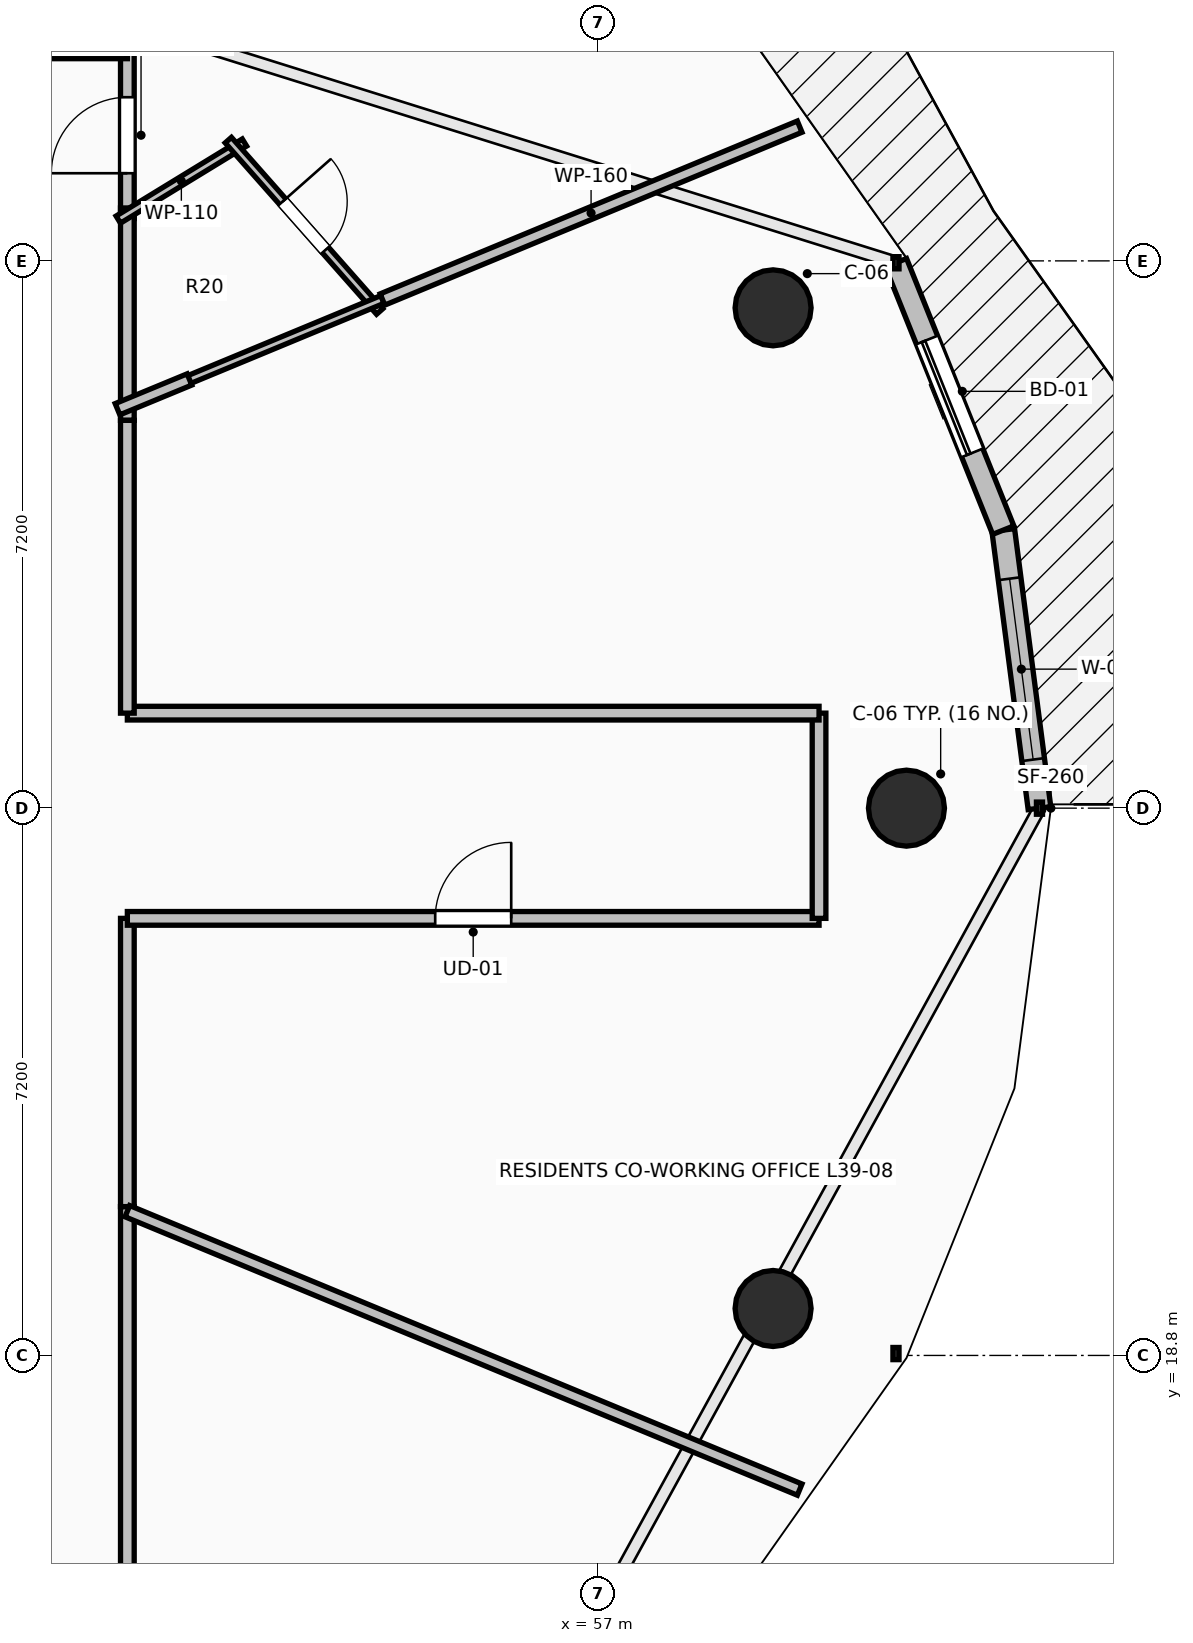
"""IFC4 building model, lengths in metres.
Left out: names, types, materials, properties, quantities, classifications, styles, units other than length and angle.
Written with IfcOpenShell. Run it as: python <this file> out.ifc"""

import sys

from ifc_helpers import new_model, si_unit, direction, frame, frame_2d, origin, origin_2d, place, context, subcontext, project, spatial, rectangle, circle, extrude, element, fill, save


model = new_model("IFC4")
c1 = context("Model", 3, precision=1e-05, world=origin(), true_north=direction((0.0, 1.0)))
c2 = subcontext(c1, "Body", "Model", "MODEL_VIEW")
j1 = project(units=[si_unit("LENGTHUNIT", "METRE"), si_unit("PLANEANGLEUNIT", "RADIAN")], contexts=[c1])
p1 = place(None, origin())
s1 = spatial("IfcSite", under=j1, at=p1, CompositionType="ELEMENT")
p2 = place(p1, origin())
s2 = spatial("IfcBuilding", under=s1, at=p2, CompositionType="ELEMENT")
p3 = place(p2, frame((0.0, 0.0, 146.6)))
s3 = spatial("IfcBuildingStorey", under=s2, at=p3, CompositionType="ELEMENT", Elevation=146.6)
for number, where, z_axis, x_axis in (
    (1, (61.05, 26.0, 0.0), (0.0, 0.0, 1.0), (1.0, 0.0, 0.0)),
    (2, (59.295, 32.582, 0.0), (0.0, 0.0, 1.0), (0.924, 0.383, 0.0)),
    (3, (59.295, 19.418, 0.0), (0.0, 0.0, 1.0), (0.924, -0.383, 0.0)),
):
    element("IfcColumn", number, at=place(p3, frame(where, z_axis=z_axis, x_axis=x_axis)), inside=s3, PredefinedType="COLUMN", context=c2, shape_type="SweptSolid", body=[
        extrude(circle(Radius=0.5, at=origin_2d()), origin(), (0.0, 0.0, 1.0), 3.5),
    ])
p4 = place(p3, frame((62.8, 26.0, 0.0), z_axis=(0.0, 0.0, 1.0), x_axis=(-0.129189225186, 0.991619959509, 0.0)))
e4 = element("IfcWall", 4, at=p4, inside=s3, PredefinedType="STANDARD", context=c2, shape_type="SweptSolid", body=[
    extrude(rectangle(XDim=3.689, YDim=0.3, at=frame_2d((1.844, 0.0))), origin(), (0.0, 0.0, 1.0), 3.24),
])
p5 = place(p4, frame((0.644, 0.0, 0.85)))
e5 = element("IfcOpeningElement", 5, at=p5, cuts=e4, PredefinedType="OPENING", context=c2, shape_type="SweptSolid", body=[
    extrude(rectangle(XDim=2.4, YDim=2.19, at=frame_2d((1.2, 1.095))), frame((0.0, 0.165, 0.0), z_axis=(0.0, -1.0, 0.0), x_axis=(1.0, 0.0, 0.0)), (0.0, 0.0, 1.0), 0.33),
])
p6 = place(p3, frame((62.323, 29.658, 0.0), z_axis=(0.0, 0.0, 1.0), x_axis=(-0.372401154411, 0.928071861546, 0.0)))
e6 = element("IfcWall", 6, at=p6, inside=s3, PredefinedType="STANDARD", context=c2, shape_type="SweptSolid", body=[
    extrude(rectangle(XDim=3.79, YDim=0.3, at=frame_2d((1.895, 0.0))), origin(), (0.0, 0.0, 1.0), 3.24),
])
p7 = place(p6, frame((1.095, 0.0, 0.0)))
e7 = element("IfcOpeningElement", 7, at=p7, cuts=e6, PredefinedType="OPENING", context=c2, shape_type="SweptSolid", body=[
    extrude(rectangle(XDim=1.6, YDim=2.3, at=frame_2d((0.8, 1.15))), frame((0.0, 0.165, 0.0), z_axis=(0.0, -1.0, 0.0), x_axis=(1.0, 0.0, 0.0)), (0.0, 0.0, 1.0), 0.33),
])
p8 = place(p3, frame((50.8, 33.756, 0.0), z_axis=(0.0, 0.0, 1.0), x_axis=(0.0, 1.0, 0.0)))
e8 = element("IfcWall", 8, at=p8, inside=s3, PredefinedType="PARTITIONING", context=c2, shape_type="SweptSolid", body=[
    extrude(rectangle(XDim=2.194, YDim=0.18, at=frame_2d((1.097, 0.0))), origin(), (0.0, 0.0, 1.0), 2.432),
])
p9 = place(p8, frame((0.597, 0.0, 0.0)))
e9 = element("IfcOpeningElement", 9, at=p9, cuts=e8, PredefinedType="OPENING", context=c2, shape_type="SweptSolid", body=[
    extrude(rectangle(XDim=1.0, YDim=2.15, at=frame_2d((0.5, 1.075))), frame((0.0, 0.105, 0.0), z_axis=(0.0, -1.0, 0.0), x_axis=(1.0, 0.0, 0.0)), (0.0, 0.0, 1.0), 0.21),
])
p10 = place(p3, frame((50.8, 35.95, 0.0), z_axis=(0.0, 0.0, 1.0), x_axis=(-1.0, 0.0, 0.0)))
e10 = element("IfcWall", 10, at=p10, inside=s3, PredefinedType="PARTITIONING", context=c2, shape_type="SweptSolid", body=[
    extrude(rectangle(XDim=2.096, YDim=0.18, at=frame_2d((1.048, 0.0))), origin(), (0.0, 0.0, 1.0), 2.972),
])
p11 = place(p3, frame((50.8, 31.102, 0.0), z_axis=(0.0, 0.0, 1.0), x_axis=(0.0, 1.0, 0.0)))
e11 = element("IfcWall", 11, at=p11, inside=s3, PredefinedType="PARTITIONING", context=c2, shape_type="SweptSolid", body=[
    extrude(rectangle(XDim=2.794, YDim=0.18, at=frame_2d((1.397, 0.0))), origin(), (0.0, 0.0, 1.0), 2.432),
])
p12 = place(p3, frame((50.8, 14.05, 0.0), z_axis=(0.0, 0.0, 1.0), x_axis=(0.0, 1.0, 0.0)))
e12 = element("IfcWall", 12, at=p12, inside=s3, PredefinedType="PARTITIONING", context=c2, shape_type="SweptSolid", body=[
    extrude(rectangle(XDim=6.708, YDim=0.18, at=frame_2d((3.354, 0.0))), origin(), (0.0, 0.0, 1.0), 2.432),
])
p13 = place(p3, frame((50.8, 20.758, 0.0), z_axis=(0.0, 0.0, 1.0), x_axis=(0.0, 1.0, 0.0)))
e13 = element("IfcWall", 13, at=p13, inside=s3, PredefinedType="PARTITIONING", context=c2, shape_type="SweptSolid", body=[
    extrude(rectangle(XDim=3.792, YDim=0.18, at=frame_2d((1.896, 0.0))), origin(), (0.0, 0.0, 1.0), 3.24),
])
p14 = place(p3, frame((50.8, 24.55, 0.0), z_axis=(0.0, 0.0, 1.0), x_axis=(1.0, 0.0, 0.0)))
e14 = element("IfcWall", 14, at=p14, inside=s3, PredefinedType="PARTITIONING", context=c2, shape_type="SweptSolid", body=[
    extrude(rectangle(XDim=9.1, YDim=0.18, at=frame_2d((4.55, 0.0))), origin(), (0.0, 0.0, 1.0), 2.432),
])
p15 = place(p14, frame((4.05, 0.0, 0.0)))
e15 = element("IfcOpeningElement", 15, at=p15, cuts=e14, PredefinedType="OPENING", context=c2, shape_type="SweptSolid", body=[
    extrude(rectangle(XDim=1.0, YDim=2.15, at=frame_2d((0.5, 1.075))), frame((0.0, 0.105, 0.0), z_axis=(0.0, -1.0, 0.0), x_axis=(1.0, 0.0, 0.0)), (0.0, 0.0, 1.0), 0.21),
])
p16 = place(p3, frame((59.9, 24.55, 0.0), z_axis=(0.0, 0.0, 1.0), x_axis=(0.0, 1.0, 0.0)))
e16 = element("IfcWall", 16, at=p16, inside=s3, PredefinedType="PARTITIONING", context=c2, shape_type="SweptSolid", body=[
    extrude(rectangle(XDim=2.7, YDim=0.18, at=frame_2d((1.35, 0.0))), origin(), (0.0, 0.0, 1.0), 2.432),
])
p17 = place(p3, frame((59.9, 27.25, 0.0), z_axis=(0.0, 0.0, 1.0), x_axis=(-1.0, 0.0, 0.0)))
e17 = element("IfcWall", 17, at=p17, inside=s3, PredefinedType="PARTITIONING", context=c2, shape_type="SweptSolid", body=[
    extrude(rectangle(XDim=9.1, YDim=0.18, at=frame_2d((4.55, 0.0))), origin(), (0.0, 0.0, 1.0), 2.432),
])
p18 = place(p3, frame((50.8, 27.25, 0.0), z_axis=(0.0, 0.0, 1.0), x_axis=(0.0, 1.0, 0.0)))
e18 = element("IfcWall", 18, at=p18, inside=s3, PredefinedType="PARTITIONING", context=c2, shape_type="SweptSolid", body=[
    extrude(rectangle(XDim=3.852, YDim=0.18, at=frame_2d((1.926, 0.0))), origin(), (0.0, 0.0, 1.0), 2.432),
])
p19 = place(p3, frame((50.68, 33.743, 0.0), z_axis=(0.0, 0.0, 1.0), x_axis=(0.853368681548, 0.52130786811, 0.0)))
e19 = element("IfcWall", 19, at=p19, inside=s3, PredefinedType="PARTITIONING", context=c2, shape_type="SweptSolid", body=[
    extrude(rectangle(XDim=1.945, YDim=0.11, at=frame_2d((0.973, 0.0))), origin(), (0.0, 0.0, 1.0), 2.972),
])
p20 = place(p3, frame((52.128, 34.789, 0.0), z_axis=(0.0, 0.0, 1.0), x_axis=(0.66196248337, -0.74953697081, 0.0)))
e20 = element("IfcWall", 20, at=p20, inside=s3, PredefinedType="PARTITIONING", context=c2, shape_type="SweptSolid", body=[
    extrude(rectangle(XDim=3.008, YDim=0.11, at=frame_2d((1.504, 0.0))), origin(), (0.0, 0.0, 1.0), 2.432),
])
p21 = place(p20, frame((1.079, 0.0, 0.0)))
e21 = element("IfcOpeningElement", 21, at=p21, cuts=e20, PredefinedType="OPENING", context=c2, shape_type="SweptSolid", body=[
    extrude(rectangle(XDim=0.85, YDim=2.1, at=frame_2d((0.425, 1.05))), frame((0.0, 0.07, 0.0), z_axis=(0.0, -1.0, 0.0), x_axis=(1.0, 0.0, 0.0)), (0.0, 0.0, 1.0), 0.14),
])
p22 = place(p3, frame((54.156, 32.693, 0.0), z_axis=(0.0, 0.0, 1.0), x_axis=(-0.923770555063, -0.382946421316, 0.0)))
e22 = element("IfcWall", 22, at=p22, inside=s3, PredefinedType="PARTITIONING", context=c2, shape_type="SweptSolid", body=[
    extrude(rectangle(XDim=2.889, YDim=0.11, at=frame_2d((1.444, 0.0))), origin(), (0.0, 0.0, 1.0), 2.432),
])
p23 = place(p3, frame((51.874, 38.824, 0.0), z_axis=(0.0, 0.0, 1.0), x_axis=(-0.734347971597, -0.678773199685, 0.0)))
e23 = element("IfcWall", 23, at=p23, inside=s3, PredefinedType="PARTITIONING", context=c2, shape_type="SweptSolid", body=[
    extrude(rectangle(XDim=4.235, YDim=0.125, at=frame_2d((2.117, 0.0))), origin(), (0.0, 0.0, 1.0), 2.922),
])
p24 = place(p23, frame((1.667, 0.0, 0.0)))
e24 = element("IfcOpeningElement", 24, at=p24, cuts=e23, PredefinedType="OPENING", context=c2, shape_type="SweptSolid", body=[
    extrude(rectangle(XDim=0.9, YDim=2.1, at=frame_2d((0.45, 1.05))), frame((0.0, 0.077, 0.0), z_axis=(0.0, -1.0, 0.0), x_axis=(1.0, 0.0, 0.0)), (0.0, 0.0, 1.0), 0.155),
])
p25 = place(p3, frame((54.156, 32.692, 0.0), z_axis=(0.0, 0.0, 1.0), x_axis=(0.923849528339, 0.382755860814, 0.0)))
e25 = element("IfcWall", 25, at=p25, inside=s3, PredefinedType="PARTITIONING", context=c2, shape_type="SweptSolid", body=[
    extrude(rectangle(XDim=5.941, YDim=0.16, at=frame_2d((2.97, 0.0))), origin(), (0.0, 0.0, 1.0), 2.432),
])
p26 = place(p3, frame((50.671, 31.249, 0.0), z_axis=(0.0, 0.0, 1.0), x_axis=(0.924089428906, 0.38217630406, 0.0)))
e26 = element("IfcWall", 26, at=p26, inside=s3, PredefinedType="PARTITIONING", context=c2, shape_type="SweptSolid", body=[
    extrude(rectangle(XDim=1.024, YDim=0.16, at=frame_2d((0.512, 0.0))), origin(), (0.0, 0.0, 1.0), 3.24),
])
p27 = place(p3, frame((50.908, 41.94, 0.0), z_axis=(0.0, 0.0, 1.0), x_axis=(-0.62935766896, -0.77711577292, 0.0)))
e27 = element("IfcWall", 27, at=p27, inside=s3, PredefinedType="PARTITIONING", context=c2, shape_type="SweptSolid", body=[
    extrude(rectangle(XDim=7.708, YDim=0.125, at=frame_2d((3.854, 0.0))), origin(), (0.0, 0.0, 1.0), 2.432),
])
p28 = place(p3, frame((59.645, 17.035, 0.0), z_axis=(0.0, 0.0, 1.0), x_axis=(-0.923902460479, 0.382628074665, 0.0)))
e28 = element("IfcWall", 28, at=p28, inside=s3, PredefinedType="PARTITIONING", context=c2, shape_type="SweptSolid", body=[
    extrude(rectangle(XDim=9.573, YDim=0.16, at=frame_2d((4.787, 0.0))), origin(), (0.0, 0.0, 1.0), 2.728),
])
p29 = place(p7, origin())
e29 = element("IfcDoor", 29, at=p29, inside=s3, OperationType="SLIDING_TO_LEFT", PredefinedType="DOOR", context=c2, shape_type="SweptSolid", body=[
    extrude(rectangle(XDim=1.6, YDim=2.3, at=frame_2d((0.8, 1.15))), frame((0.0, 0.025, 0.0), z_axis=(0.0, -1.0, 0.0), x_axis=(1.0, 0.0, 0.0)), (0.0, 0.0, 1.0), 0.05),
])
fill(e7, e29)
p30 = place(p5, origin())
e30 = element("IfcWindow", 30, at=p30, inside=s3, PartitioningType="SINGLE_PANEL", PredefinedType="WINDOW", context=c2, shape_type="SweptSolid", body=[
    extrude(rectangle(XDim=2.4, YDim=2.19, at=frame_2d((1.2, 1.095))), frame((0.0, 0.03, 0.0), z_axis=(0.0, -1.0, 0.0), x_axis=(1.0, 0.0, 0.0)), (0.0, 0.0, 1.0), 0.06),
])
fill(e5, e30)
p31 = place(p9, origin())
e31 = element("IfcDoor", 31, at=p31, inside=s3, OperationType="SINGLE_SWING_LEFT", PredefinedType="DOOR", context=c2, shape_type="SweptSolid", body=[
    extrude(rectangle(XDim=1.0, YDim=2.15, at=frame_2d((0.5, 1.075))), frame((0.0, 0.025, 0.0), z_axis=(0.0, -1.0, 0.0), x_axis=(1.0, 0.0, 0.0)), (0.0, 0.0, 1.0), 0.05),
])
fill(e9, e31)
p32 = place(p15, origin())
e32 = element("IfcDoor", 32, at=p32, inside=s3, OperationType="SINGLE_SWING_RIGHT", PredefinedType="DOOR", context=c2, shape_type="SweptSolid", body=[
    extrude(rectangle(XDim=1.0, YDim=2.15, at=frame_2d((0.5, 1.075))), frame((0.0, 0.025, 0.0), z_axis=(0.0, -1.0, 0.0), x_axis=(1.0, 0.0, 0.0)), (0.0, 0.0, 1.0), 0.05),
])
fill(e15, e32)
p33 = place(p21, origin())
e33 = element("IfcDoor", 33, at=p33, inside=s3, OperationType="SINGLE_SWING_LEFT", PredefinedType="DOOR", context=c2, shape_type="SweptSolid", body=[
    extrude(rectangle(XDim=0.85, YDim=2.1, at=frame_2d((0.425, 1.05))), frame((0.0, 0.025, 0.0), z_axis=(0.0, -1.0, 0.0), x_axis=(1.0, 0.0, 0.0)), (0.0, 0.0, 1.0), 0.05),
])
fill(e21, e33)
save(model, sys.argv[1])
